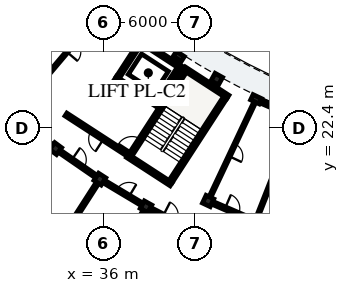
"""IFC4 building model, lengths in metres.
Left out: names, types, materials, properties, quantities, classifications, styles, units other than length and angle.
Written with IfcOpenShell. Run it as: python <this file> out.ifc"""

import sys

from ifc_helpers import new_model, si_unit, direction, frame, frame_2d, origin, origin_2d, place, context, subcontext, project, spatial, rectangle, extrude, element, fill, save


model = new_model("IFC4")
c1 = context("Model", 3, precision=1e-05, world=origin(), true_north=direction((0.0, 1.0)))
c2 = subcontext(c1, "Body", "Model", "MODEL_VIEW")
j1 = project(units=[si_unit("LENGTHUNIT", "METRE"), si_unit("PLANEANGLEUNIT", "RADIAN")], contexts=[c1])
p1 = place(None, origin())
s1 = spatial("IfcSite", under=j1, at=p1, CompositionType="ELEMENT")
p2 = place(p1, origin())
s2 = spatial("IfcBuilding", under=s1, at=p2, CompositionType="ELEMENT")
p3 = place(p2, frame((0.0, 0.0, 22.28)))
s3 = spatial("IfcBuildingStorey", under=s2, at=p3, CompositionType="ELEMENT", Elevation=22.28)
p4 = place(p3, frame((40.413, 18.882, 0.0), z_axis=(0.0, 0.0, 1.0), x_axis=(0.544629435258, 0.838676802022, 0.0)))
e1 = element("IfcWall", 1, at=p4, inside=s3, PredefinedType="SHEAR", context=c2, shape_type="SweptSolid", body=[
    extrude(rectangle(XDim=6.6, YDim=0.25, at=frame_2d((3.3, 0.0))), origin(), (0.0, 0.0, 1.0), 3.11),
])
p5 = place(p3, frame((44.18, 24.454, 0.0), z_axis=(0.0, 0.0, 1.0), x_axis=(-0.838699580527, 0.544594356953, 0.0)))
e2 = element("IfcWall", 2, at=p5, inside=s3, PredefinedType="SHEAR", context=c2, shape_type="SweptSolid", body=[
    extrude(rectangle(XDim=3.42, YDim=0.25, at=frame_2d((1.71, 0.0))), origin(), (0.0, 0.0, 1.0), 3.11),
])
p6 = place(p3, frame((40.449, 18.709, 0.0), z_axis=(0.0, 0.0, 1.0), x_axis=(-0.838678407117, 0.544626963559, 0.0)))
e3 = element("IfcWall", 3, at=p6, inside=s3, PredefinedType="SHEAR", context=c2, shape_type="SweptSolid", body=[
    extrude(rectangle(XDim=3.42, YDim=0.25, at=frame_2d((1.71, 0.0))), origin(), (0.0, 0.0, 1.0), 3.11),
])
p7 = place(p3, frame((37.754, 20.608, 0.0), z_axis=(0.0, 0.0, 1.0), x_axis=(0.544655453679, 0.838659905312, 0.0)))
e4 = element("IfcWall", 4, at=p7, inside=s3, PredefinedType="SHEAR", context=c2, shape_type="SweptSolid", body=[
    extrude(rectangle(XDim=6.6, YDim=0.25, at=frame_2d((3.3, 0.0))), origin(), (0.0, 0.0, 1.0), 3.11),
])
p8 = place(p7, frame((0.22, 0.0, 0.0)))
e5 = element("IfcOpeningElement", 5, at=p8, cuts=e4, PredefinedType="OPENING", context=c2, shape_type="SweptSolid", body=[
    extrude(rectangle(XDim=1.05, YDim=2.15, at=frame_2d((0.525, 1.075))), frame((0.0, 0.135, 0.0), z_axis=(0.0, -1.0, 0.0), x_axis=(1.0, 0.0, 0.0)), (0.0, 0.0, 1.0), 0.27),
])
p9 = place(p3, frame((39.516, 23.917, 0.0), z_axis=(0.0, 0.0, 1.0), x_axis=(-0.838660840752, 0.544654013286, 0.0)))
e6 = element("IfcWall", 6, at=p9, inside=s3, PredefinedType="SHEAR", context=c2, shape_type="SweptSolid", body=[
    extrude(rectangle(XDim=3.26, YDim=0.23, at=frame_2d((1.63, 0.0))), origin(), (0.0, 0.0, 1.0), 3.11),
])
p10 = place(p9, frame((0.9, 0.0, 0.0)))
e7 = element("IfcOpeningElement", 7, at=p10, cuts=e6, PredefinedType="OPENING", context=c2, shape_type="SweptSolid", body=[
    extrude(rectangle(XDim=1.0, YDim=2.15, at=frame_2d((0.5, 1.075))), frame((0.0, 0.125, 0.0), z_axis=(0.0, -1.0, 0.0), x_axis=(1.0, 0.0, 0.0)), (0.0, 0.0, 1.0), 0.25),
])
p11 = place(p3, frame((41.112, 26.375, 0.0), z_axis=(0.0, 0.0, 1.0), x_axis=(-0.838638623546, 0.544688221919, 0.0)))
e8 = element("IfcWall", 8, at=p11, inside=s3, PredefinedType="SHEAR", context=c2, shape_type="SweptSolid", body=[
    extrude(rectangle(XDim=3.26, YDim=0.23, at=frame_2d((1.63, 0.0))), origin(), (0.0, 0.0, 1.0), 3.11),
])
p12 = place(p3, frame((39.482, 24.077, 0.0), z_axis=(0.0, 0.0, 1.0), x_axis=(0.544686387605, 0.838639814913, 0.0)))
e9 = element("IfcWall", 9, at=p12, inside=s3, PredefinedType="SHEAR", context=c2, shape_type="SweptSolid", body=[
    extrude(rectangle(XDim=2.7, YDim=0.23, at=frame_2d((1.35, 0.0))), origin(), (0.0, 0.0, 1.0), 3.11),
])
p13 = place(p3, frame((36.941, 25.727, 0.0), z_axis=(0.0, 0.0, 1.0), x_axis=(0.544622789439, 0.838681117722, 0.0)))
e10 = element("IfcWall", 10, at=p13, inside=s3, PredefinedType="SHEAR", context=c2, shape_type="SweptSolid", body=[
    extrude(rectangle(XDim=2.7, YDim=0.23, at=frame_2d((1.35, 0.0))), origin(), (0.0, 0.0, 1.0), 3.11),
])
p14 = place(p3, frame((32.85, 21.052, 0.0), z_axis=(0.0, 0.0, 1.0), x_axis=(-0.594822786751, -0.803856860617, 0.0)))
e11 = element("IfcColumn", 11, at=p14, inside=s3, PredefinedType="COLUMN", context=c2, shape_type="SweptSolid", body=[
    extrude(rectangle(XDim=0.56, YDim=0.56, at=origin_2d()), origin(), (0.0, 0.0, 1.0), 3.11),
])
p15 = place(p3, frame((40.954, 27.116, 0.0), z_axis=(0.0, 0.0, 1.0), x_axis=(-0.540974471368, -0.841039012964, 0.0)))
e12 = element("IfcColumn", 12, at=p15, inside=s3, PredefinedType="PILASTER", context=c2, shape_type="SweptSolid", body=[
    extrude(rectangle(XDim=0.38, YDim=0.62, at=origin_2d()), origin(), (0.0, 0.0, 1.0), 3.11),
])
for number, where, z_axis, x_axis in (
    (13, (35.76, 19.042, 0.0), (0.0, 0.0, 1.0), (-0.541, -0.841, 0.0)),
    (14, (43.45, 25.623, 0.0), (0.0, 0.0, 1.0), (-0.485, -0.875, 0.0)),
    (15, (38.796, 17.227, 0.0), (0.0, 0.0, 1.0), (-0.485, -0.875, 0.0)),
):
    element("IfcColumn", number, at=place(p3, frame(where, z_axis=z_axis, x_axis=x_axis)), inside=s3, PredefinedType="COLUMN", context=c2, shape_type="SweptSolid", body=[
        extrude(rectangle(XDim=0.56, YDim=0.56, at=origin_2d()), origin(), (0.0, 0.0, 1.0), 3.11),
    ])
p16 = place(p3, frame((46.039, 24.297, 0.0), z_axis=(0.0, 0.0, 1.0), x_axis=(-0.426568739901, -0.904455145454, 0.0)))
e16 = element("IfcColumn", 16, at=p16, inside=s3, PredefinedType="PILASTER", context=c2, shape_type="SweptSolid", body=[
    extrude(rectangle(XDim=0.38, YDim=0.62, at=origin_2d()), origin(), (0.0, 0.0, 1.0), 3.11),
])
p17 = place(p3, frame((42.882, 17.604, 0.0), z_axis=(0.0, 0.0, 1.0), x_axis=(-0.426568739901, -0.904455145454, 0.0)))
e17 = element("IfcColumn", 17, at=p17, inside=s3, PredefinedType="COLUMN", context=c2, shape_type="SweptSolid", body=[
    extrude(rectangle(XDim=0.56, YDim=0.56, at=origin_2d()), origin(), (0.0, 0.0, 1.0), 3.11),
])
p18 = place(p3, frame((46.186, 24.233, 0.0), z_axis=(0.0, 0.0, 1.0), x_axis=(0.91795321239, -0.396688668686, 0.0)))
e18 = element("IfcWall", 18, at=p18, inside=s3, PredefinedType="SOLIDWALL", context=c2, shape_type="SweptSolid", body=[
    extrude(rectangle(XDim=2.499, YDim=0.245, at=frame_2d((1.25, 0.0))), origin(), (0.0, 0.0, 1.0), 2.355),
])
p19 = place(p18, frame((0.549, 0.0, 0.55)))
e19 = element("IfcOpeningElement", 19, at=p19, cuts=e18, PredefinedType="OPENING", context=c2, shape_type="SweptSolid", body=[
    extrude(rectangle(XDim=1.4, YDim=1.635, at=frame_2d((0.7, 0.817))), frame((0.0, 0.133, 0.0), z_axis=(0.0, -1.0, 0.0), x_axis=(1.0, 0.0, 0.0)), (0.0, 0.0, 1.0), 0.265),
])
p20 = place(p3, frame((37.639, 20.623, 0.0), z_axis=(0.0, 0.0, 1.0), x_axis=(-0.838681446513, 0.544622283124, 0.0)))
e20 = element("IfcWall", 20, at=p20, inside=s3, PredefinedType="PARTITIONING", context=c2, shape_type="SweptSolid", body=[
    extrude(rectangle(XDim=4.9, YDim=0.22, at=frame_2d((2.45, 0.0))), origin(), (0.0, 0.0, 1.0), 2.34),
])
p21 = place(p20, frame((1.95, 0.0, 0.0)))
e21 = element("IfcOpeningElement", 21, at=p21, cuts=e20, PredefinedType="OPENING", context=c2, shape_type="SweptSolid", body=[
    extrude(rectangle(XDim=0.98, YDim=2.14, at=frame_2d((0.49, 1.07))), frame((0.0, 0.12, 0.0), z_axis=(0.0, -1.0, 0.0), x_axis=(1.0, 0.0, 0.0)), (0.0, 0.0, 1.0), 0.24),
])
p22 = place(p3, frame((36.021, 30.269, 0.0), z_axis=(0.0, 0.0, 1.0), x_axis=(-0.646121311019, -0.763234728932, 0.0)))
e22 = element("IfcWall", 22, at=p22, inside=s3, PredefinedType="PARTITIONING", context=c2, shape_type="SweptSolid", body=[
    extrude(rectangle(XDim=6.6, YDim=0.125, at=frame_2d((3.3, 0.0))), origin(), (0.0, 0.0, 1.0), 2.37),
])
p23 = place(p22, frame((2.845, 0.0, 0.0)))
e23 = element("IfcOpeningElement", 23, at=p23, cuts=e22, PredefinedType="OPENING", context=c2, shape_type="SweptSolid", body=[
    extrude(rectangle(XDim=0.91, YDim=2.1, at=frame_2d((0.455, 1.05))), frame((0.0, 0.073, 0.0), z_axis=(0.0, -1.0, 0.0), x_axis=(1.0, 0.0, 0.0)), (0.0, 0.0, 1.0), 0.145),
])
p24 = place(p3, frame((30.351, 23.03, 0.0), z_axis=(0.0, 0.0, 1.0), x_axis=(0.783965548427, -0.620804332201, 0.0)))
e24 = element("IfcWall", 24, at=p24, inside=s3, PredefinedType="PARTITIONING", context=c2, shape_type="SweptSolid", body=[
    extrude(rectangle(XDim=2.837, YDim=0.195, at=frame_2d((1.418, 0.0))), origin(), (0.0, 0.0, 1.0), 2.37),
])
p25 = place(p24, frame((0.934, 0.0, 0.0)))
e25 = element("IfcOpeningElement", 25, at=p25, cuts=e24, PredefinedType="OPENING", context=c2, shape_type="SweptSolid", body=[
    extrude(rectangle(XDim=0.97, YDim=2.15, at=frame_2d((0.485, 1.075))), frame((0.0, 0.107, 0.0), z_axis=(0.0, -1.0, 0.0), x_axis=(1.0, 0.0, 0.0)), (0.0, 0.0, 1.0), 0.215),
])
p26 = place(p3, frame((33.138, 20.853, 0.0), z_axis=(0.0, 0.0, 1.0), x_axis=(0.822870075235, -0.568229565653, 0.0)))
e26 = element("IfcWall", 26, at=p26, inside=s3, PredefinedType="PARTITIONING", context=c2, shape_type="SweptSolid", body=[
    extrude(rectangle(XDim=2.837, YDim=0.195, at=frame_2d((1.418, 0.0))), origin(), (0.0, 0.0, 1.0), 2.37),
])
p27 = place(p26, frame((0.944, 0.0, 0.0)))
e27 = element("IfcOpeningElement", 27, at=p27, cuts=e26, PredefinedType="OPENING", context=c2, shape_type="SweptSolid", body=[
    extrude(rectangle(XDim=0.95, YDim=2.13, at=frame_2d((0.475, 1.065))), frame((0.0, 0.107, 0.0), z_axis=(0.0, -1.0, 0.0), x_axis=(1.0, 0.0, 0.0)), (0.0, 0.0, 1.0), 0.215),
])
p28 = place(p3, frame((35.544, 18.705, 0.0), z_axis=(0.0, 0.0, 1.0), x_axis=(-0.540959731567, -0.84104849374, 0.0)))
e28 = element("IfcWall", 28, at=p28, inside=s3, PredefinedType="PARTITIONING", context=c2, shape_type="SweptSolid", body=[
    extrude(rectangle(XDim=4.7, YDim=0.175, at=frame_2d((2.35, 0.0))), origin(), (0.0, 0.0, 1.0), 2.37),
])
p29 = place(p3, frame((36.061, 18.862, 0.0), z_axis=(0.0, 0.0, 1.0), x_axis=(0.858281647443, -0.51317892948, 0.0)))
e29 = element("IfcWall", 29, at=p29, inside=s3, PredefinedType="PARTITIONING", context=c2, shape_type="SweptSolid", body=[
    extrude(rectangle(XDim=2.837, YDim=0.195, at=frame_2d((1.418, 0.0))), origin(), (0.0, 0.0, 1.0), 2.37),
])
p30 = place(p29, frame((0.954, 0.0, 0.0)))
e30 = element("IfcOpeningElement", 30, at=p30, cuts=e29, PredefinedType="OPENING", context=c2, shape_type="SweptSolid", body=[
    extrude(rectangle(XDim=0.93, YDim=2.12, at=frame_2d((0.465, 1.06))), frame((0.0, 0.107, 0.0), z_axis=(0.0, -1.0, 0.0), x_axis=(1.0, 0.0, 0.0)), (0.0, 0.0, 1.0), 0.215),
])
p31 = place(p3, frame((38.602, 16.877, 0.0), z_axis=(0.0, 0.0, 1.0), x_axis=(-0.484813534336, -0.874617537513, 0.0)))
e31 = element("IfcWall", 31, at=p31, inside=s3, PredefinedType="PARTITIONING", context=c2, shape_type="SweptSolid", body=[
    extrude(rectangle(XDim=4.7, YDim=0.125, at=frame_2d((2.35, 0.0))), origin(), (0.0, 0.0, 1.0), 2.37),
])
p32 = place(p31, frame((1.915, 0.0, 0.0)))
e32 = element("IfcOpeningElement", 32, at=p32, cuts=e31, PredefinedType="OPENING", context=c2, shape_type="SweptSolid", body=[
    extrude(rectangle(XDim=0.87, YDim=2.08, at=frame_2d((0.435, 1.04))), frame((0.0, 0.073, 0.0), z_axis=(0.0, -1.0, 0.0), x_axis=(1.0, 0.0, 0.0)), (0.0, 0.0, 1.0), 0.145),
])
p33 = place(p3, frame((39.107, 17.067, 0.0), z_axis=(0.0, 0.0, 1.0), x_axis=(0.890030590607, -0.45590080915, 0.0)))
e33 = element("IfcWall", 33, at=p33, inside=s3, PredefinedType="PARTITIONING", context=c2, shape_type="SweptSolid", body=[
    extrude(rectangle(XDim=2.837, YDim=0.195, at=frame_2d((1.418, 0.0))), origin(), (0.0, 0.0, 1.0), 2.37),
])
p34 = place(p33, frame((0.924, 0.0, 0.0)))
e34 = element("IfcOpeningElement", 34, at=p34, cuts=e33, PredefinedType="OPENING", context=c2, shape_type="SweptSolid", body=[
    extrude(rectangle(XDim=0.99, YDim=2.16, at=frame_2d((0.495, 1.08))), frame((0.0, 0.107, 0.0), z_axis=(0.0, -1.0, 0.0), x_axis=(1.0, 0.0, 0.0)), (0.0, 0.0, 1.0), 0.215),
])
p35 = place(p3, frame((45.868, 23.935, 0.0), z_axis=(0.0, 0.0, 1.0), x_axis=(-0.426573573579, -0.904452865728, 0.0)))
e35 = element("IfcWall", 35, at=p35, inside=s3, PredefinedType="PARTITIONING", context=c2, shape_type="SweptSolid", body=[
    extrude(rectangle(XDim=6.6, YDim=0.125, at=frame_2d((3.3, 0.0))), origin(), (0.0, 0.0, 1.0), 2.37),
])
p36 = place(p35, frame((2.855, 0.0, 0.0)))
e36 = element("IfcOpeningElement", 36, at=p36, cuts=e35, PredefinedType="OPENING", context=c2, shape_type="SweptSolid", body=[
    extrude(rectangle(XDim=0.89, YDim=2.1, at=frame_2d((0.445, 1.05))), frame((0.0, 0.073, 0.0), z_axis=(0.0, -1.0, 0.0), x_axis=(1.0, 0.0, 0.0)), (0.0, 0.0, 1.0), 0.145),
])
p37 = place(p3, frame((43.204, 17.465, 0.0), z_axis=(0.0, 0.0, 1.0), x_axis=(0.91793557165, -0.39672948756, 0.0)))
e37 = element("IfcWall", 37, at=p37, inside=s3, PredefinedType="PARTITIONING", context=c2, shape_type="SweptSolid", body=[
    extrude(rectangle(XDim=2.693, YDim=0.195, at=frame_2d((1.346, 0.0))), origin(), (0.0, 0.0, 1.0), 2.37),
])
p38 = place(p37, frame((0.862, 0.0, 0.0)))
e38 = element("IfcOpeningElement", 38, at=p38, cuts=e37, PredefinedType="OPENING", context=c2, shape_type="SweptSolid", body=[
    extrude(rectangle(XDim=0.97, YDim=2.15, at=frame_2d((0.485, 1.075))), frame((0.0, 0.107, 0.0), z_axis=(0.0, -1.0, 0.0), x_axis=(1.0, 0.0, 0.0)), (0.0, 0.0, 1.0), 0.215),
])
p39 = place(p3, frame((48.562, 22.771, 0.0), z_axis=(0.0, 0.0, 1.0), x_axis=(-0.366512873936, -0.930412979939, 0.0)))
e39 = element("IfcWall", 39, at=p39, inside=s3, PredefinedType="PARTITIONING", context=c2, shape_type="SweptSolid", body=[
    extrude(rectangle(XDim=6.6, YDim=0.125, at=frame_2d((3.3, 0.0))), origin(), (0.0, 0.0, 1.0), 2.37),
])
p40 = place(p39, frame((2.865, 0.0, 0.0)))
e40 = element("IfcOpeningElement", 40, at=p40, cuts=e39, PredefinedType="OPENING", context=c2, shape_type="SweptSolid", body=[
    extrude(rectangle(XDim=0.87, YDim=2.08, at=frame_2d((0.435, 1.04))), frame((0.0, 0.073, 0.0), z_axis=(0.0, -1.0, 0.0), x_axis=(1.0, 0.0, 0.0)), (0.0, 0.0, 1.0), 0.145),
])
p41 = place(p19, origin())
e41 = element("IfcWindow", 41, at=p41, inside=s3, PartitioningType="SINGLE_PANEL", PredefinedType="WINDOW", context=c2, shape_type="SweptSolid", body=[
    extrude(rectangle(XDim=1.4, YDim=1.635, at=frame_2d((0.7, 0.817))), frame((0.0, 0.03, 0.0), z_axis=(0.0, -1.0, 0.0), x_axis=(1.0, 0.0, 0.0)), (0.0, 0.0, 1.0), 0.06),
])
fill(e19, e41)
p42 = place(p8, origin())
e42 = element("IfcDoor", 42, at=p42, inside=s3, OperationType="SINGLE_SWING_LEFT", PredefinedType="DOOR", context=c2, shape_type="SweptSolid", body=[
    extrude(rectangle(XDim=1.05, YDim=2.15, at=frame_2d((0.525, 1.075))), frame((0.0, 0.025, 0.0), z_axis=(0.0, -1.0, 0.0), x_axis=(1.0, 0.0, 0.0)), (0.0, 0.0, 1.0), 0.05),
])
fill(e5, e42)
p43 = place(p10, origin())
e43 = element("IfcDoor", 43, at=p43, inside=s3, OperationType="DOUBLE_DOOR_SLIDING", PredefinedType="DOOR", context=c2, shape_type="SweptSolid", body=[
    extrude(rectangle(XDim=1.0, YDim=2.15, at=frame_2d((0.5, 1.075))), frame((0.0, 0.025, 0.0), z_axis=(0.0, -1.0, 0.0), x_axis=(1.0, 0.0, 0.0)), (0.0, 0.0, 1.0), 0.05),
])
fill(e7, e43)
p44 = place(p21, origin())
e44 = element("IfcDoor", 44, at=p44, inside=s3, OperationType="SINGLE_SWING_LEFT", PredefinedType="DOOR", context=c2, shape_type="SweptSolid", body=[
    extrude(rectangle(XDim=0.98, YDim=2.14, at=frame_2d((0.49, 1.07))), frame((0.0, 0.025, 0.0), z_axis=(0.0, -1.0, 0.0), x_axis=(1.0, 0.0, 0.0)), (0.0, 0.0, 1.0), 0.05),
])
fill(e21, e44)
p45 = place(p27, origin())
e45 = element("IfcDoor", 45, at=p45, inside=s3, OperationType="SINGLE_SWING_LEFT", PredefinedType="DOOR", context=c2, shape_type="SweptSolid", body=[
    extrude(rectangle(XDim=0.95, YDim=2.13, at=frame_2d((0.475, 1.065))), frame((0.0, 0.025, 0.0), z_axis=(0.0, -1.0, 0.0), x_axis=(1.0, 0.0, 0.0)), (0.0, 0.0, 1.0), 0.05),
])
fill(e27, e45)
p46 = place(p30, origin())
e46 = element("IfcDoor", 46, at=p46, inside=s3, OperationType="SINGLE_SWING_RIGHT", PredefinedType="DOOR", context=c2, shape_type="SweptSolid", body=[
    extrude(rectangle(XDim=0.93, YDim=2.12, at=frame_2d((0.465, 1.06))), frame((0.0, 0.025, 0.0), z_axis=(0.0, -1.0, 0.0), x_axis=(1.0, 0.0, 0.0)), (0.0, 0.0, 1.0), 0.05),
])
fill(e30, e46)
p47 = place(p36, origin())
e47 = element("IfcDoor", 47, at=p47, inside=s3, OperationType="SINGLE_SWING_RIGHT", PredefinedType="DOOR", context=c2, shape_type="SweptSolid", body=[
    extrude(rectangle(XDim=0.89, YDim=2.1, at=frame_2d((0.445, 1.05))), frame((0.0, 0.025, 0.0), z_axis=(0.0, -1.0, 0.0), x_axis=(1.0, 0.0, 0.0)), (0.0, 0.0, 1.0), 0.05),
])
fill(e36, e47)
p48 = place(p38, origin())
e48 = element("IfcDoor", 48, at=p48, inside=s3, OperationType="SINGLE_SWING_LEFT", PredefinedType="DOOR", context=c2, shape_type="SweptSolid", body=[
    extrude(rectangle(XDim=0.97, YDim=2.15, at=frame_2d((0.485, 1.075))), frame((0.0, 0.025, 0.0), z_axis=(0.0, -1.0, 0.0), x_axis=(1.0, 0.0, 0.0)), (0.0, 0.0, 1.0), 0.05),
])
fill(e38, e48)
save(model, sys.argv[1])
